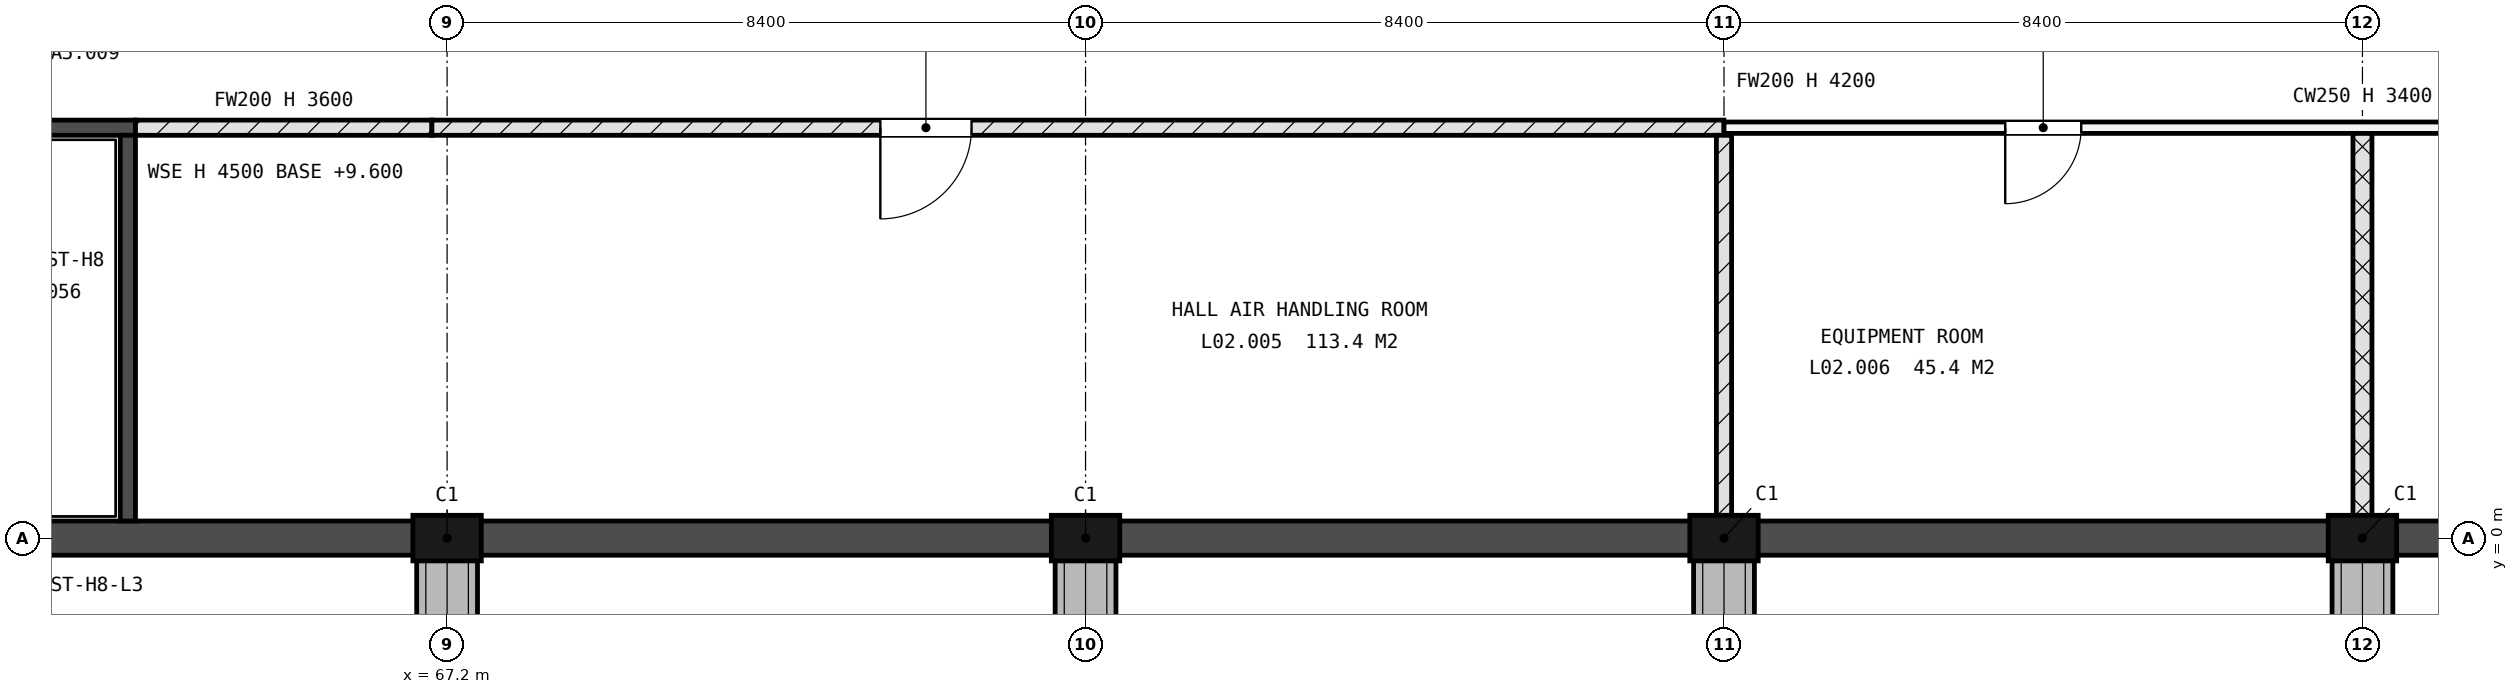
"""IFC4 building model, lengths in metres.
Left out: names, types, materials, properties, quantities, classifications, styles, units other than length and angle.
Written with IfcOpenShell. Run it as: python <this file> out.ifc"""

import sys

from ifc_helpers import new_model, si_unit, direction, frame, frame_2d, origin, origin_2d, place, context, subcontext, project, spatial, rectangle, extrude, element, fill, save


model = new_model("IFC4")
c1 = context("Model", 3, precision=1e-05, world=origin(), true_north=direction((0.0, 1.0)))
c2 = subcontext(c1, "Body", "Model", "MODEL_VIEW")
j1 = project(units=[si_unit("LENGTHUNIT", "METRE"), si_unit("PLANEANGLEUNIT", "RADIAN")], contexts=[c1])
p1 = place(None, origin())
s1 = spatial("IfcSite", under=j1, at=p1, CompositionType="ELEMENT")
p2 = place(p1, origin())
s2 = spatial("IfcBuilding", under=s1, at=p2, CompositionType="ELEMENT")
p3 = place(p2, frame((0.0, 0.0, 9.9)))
s3 = spatial("IfcBuildingStorey", under=s2, at=p3, CompositionType="ELEMENT", Elevation=9.9)
for number, where, z_axis, x_axis in (
    (1, (67.2, 0.0, -0.25), (0.0, 0.0, 1.0), (1.0, 0.0, 0.0)),
    (2, (75.6, 0.0, -0.25), (0.0, 0.0, 1.0), (1.0, 0.0, 0.0)),
    (3, (84.0, 0.0, -0.25), (0.0, 0.0, 1.0), (1.0, 0.0, 0.0)),
    (4, (92.4, 0.0, -0.25), (0.0, 0.0, 1.0), (1.0, 0.0, 0.0)),
):
    element("IfcColumn", number, at=place(p3, frame(where, z_axis=z_axis, x_axis=x_axis)), inside=s3, PredefinedType="PILASTER", context=c2, shape_type="SweptSolid", body=[
        extrude(rectangle(XDim=0.9, YDim=0.6, at=origin_2d()), origin(), (0.0, 0.0, 1.0), 4.45),
    ])
p4 = place(p3, frame((0.0, 0.0, -0.25), z_axis=(0.0, 0.0, 1.0), x_axis=(1.0, 0.0, 0.0)))
e5 = element("IfcWall", 5, at=p4, inside=s3, PredefinedType="SOLIDWALL", context=c2, shape_type="SweptSolid", body=[
    extrude(rectangle(XDim=168.0, YDim=0.45, at=frame_2d((84.0, 0.0))), origin(), (0.0, 0.0, 1.0), 4.45),
])
p5 = place(p4, frame((27.075, 0.0, 1.45)))
e6 = element("IfcOpeningElement", 6, at=p5, cuts=e5, PredefinedType="OPENING", context=c2, shape_type="SweptSolid", body=[
    extrude(rectangle(XDim=0.45, YDim=2.4, at=frame_2d((0.225, 1.2))), frame((0.0, 0.235, 0.0), z_axis=(0.0, -1.0, 0.0), x_axis=(1.0, 0.0, 0.0)), (0.0, 0.0, 1.0), 0.47),
])
p6 = place(p4, frame((31.275, 0.0, 1.45)))
e7 = element("IfcOpeningElement", 7, at=p6, cuts=e5, PredefinedType="OPENING", context=c2, shape_type="SweptSolid", body=[
    extrude(rectangle(XDim=0.45, YDim=2.4, at=frame_2d((0.225, 1.2))), frame((0.0, 0.235, 0.0), z_axis=(0.0, -1.0, 0.0), x_axis=(1.0, 0.0, 0.0)), (0.0, 0.0, 1.0), 0.47),
])
p7 = place(p4, frame((35.475, 0.0, 1.45)))
e8 = element("IfcOpeningElement", 8, at=p7, cuts=e5, PredefinedType="OPENING", context=c2, shape_type="SweptSolid", body=[
    extrude(rectangle(XDim=0.45, YDim=2.4, at=frame_2d((0.225, 1.2))), frame((0.0, 0.235, 0.0), z_axis=(0.0, -1.0, 0.0), x_axis=(1.0, 0.0, 0.0)), (0.0, 0.0, 1.0), 0.47),
])
p8 = place(p4, frame((39.675, 0.0, 1.45)))
e9 = element("IfcOpeningElement", 9, at=p8, cuts=e5, PredefinedType="OPENING", context=c2, shape_type="SweptSolid", body=[
    extrude(rectangle(XDim=0.45, YDim=2.4, at=frame_2d((0.225, 1.2))), frame((0.0, 0.235, 0.0), z_axis=(0.0, -1.0, 0.0), x_axis=(1.0, 0.0, 0.0)), (0.0, 0.0, 1.0), 0.47),
])
p9 = place(p4, frame((94.275, 0.0, 1.45)))
e10 = element("IfcOpeningElement", 10, at=p9, cuts=e5, PredefinedType="OPENING", context=c2, shape_type="SweptSolid", body=[
    extrude(rectangle(XDim=0.45, YDim=2.4, at=frame_2d((0.225, 1.2))), frame((0.0, 0.235, 0.0), z_axis=(0.0, -1.0, 0.0), x_axis=(1.0, 0.0, 0.0)), (0.0, 0.0, 1.0), 0.47),
])
p10 = place(p4, frame((98.475, 0.0, 1.45)))
e11 = element("IfcOpeningElement", 11, at=p10, cuts=e5, PredefinedType="OPENING", context=c2, shape_type="SweptSolid", body=[
    extrude(rectangle(XDim=0.45, YDim=2.4, at=frame_2d((0.225, 1.2))), frame((0.0, 0.235, 0.0), z_axis=(0.0, -1.0, 0.0), x_axis=(1.0, 0.0, 0.0)), (0.0, 0.0, 1.0), 0.47),
])
p11 = place(p4, frame((102.675, 0.0, 1.45)))
e12 = element("IfcOpeningElement", 12, at=p11, cuts=e5, PredefinedType="OPENING", context=c2, shape_type="SweptSolid", body=[
    extrude(rectangle(XDim=0.45, YDim=2.4, at=frame_2d((0.225, 1.2))), frame((0.0, 0.235, 0.0), z_axis=(0.0, -1.0, 0.0), x_axis=(1.0, 0.0, 0.0)), (0.0, 0.0, 1.0), 0.47),
])
p12 = place(p4, frame((106.875, 0.0, 1.45)))
e13 = element("IfcOpeningElement", 13, at=p12, cuts=e5, PredefinedType="OPENING", context=c2, shape_type="SweptSolid", body=[
    extrude(rectangle(XDim=0.45, YDim=2.4, at=frame_2d((0.225, 1.2))), frame((0.0, 0.235, 0.0), z_axis=(0.0, -1.0, 0.0), x_axis=(1.0, 0.0, 0.0)), (0.0, 0.0, 1.0), 0.47),
])
p13 = place(p4, frame((111.075, 0.0, 1.45)))
e14 = element("IfcOpeningElement", 14, at=p13, cuts=e5, PredefinedType="OPENING", context=c2, shape_type="SweptSolid", body=[
    extrude(rectangle(XDim=0.45, YDim=2.4, at=frame_2d((0.225, 1.2))), frame((0.0, 0.235, 0.0), z_axis=(0.0, -1.0, 0.0), x_axis=(1.0, 0.0, 0.0)), (0.0, 0.0, 1.0), 0.47),
])
p14 = place(p4, frame((115.275, 0.0, 1.45)))
e15 = element("IfcOpeningElement", 15, at=p14, cuts=e5, PredefinedType="OPENING", context=c2, shape_type="SweptSolid", body=[
    extrude(rectangle(XDim=0.45, YDim=2.4, at=frame_2d((0.225, 1.2))), frame((0.0, 0.235, 0.0), z_axis=(0.0, -1.0, 0.0), x_axis=(1.0, 0.0, 0.0)), (0.0, 0.0, 1.0), 0.47),
])
p15 = place(p4, frame((127.875, 0.0, 1.45)))
e16 = element("IfcOpeningElement", 16, at=p15, cuts=e5, PredefinedType="OPENING", context=c2, shape_type="SweptSolid", body=[
    extrude(rectangle(XDim=0.45, YDim=2.4, at=frame_2d((0.225, 1.2))), frame((0.0, 0.235, 0.0), z_axis=(0.0, -1.0, 0.0), x_axis=(1.0, 0.0, 0.0)), (0.0, 0.0, 1.0), 0.47),
])
p16 = place(p4, frame((132.075, 0.0, 1.45)))
e17 = element("IfcOpeningElement", 17, at=p16, cuts=e5, PredefinedType="OPENING", context=c2, shape_type="SweptSolid", body=[
    extrude(rectangle(XDim=0.45, YDim=2.4, at=frame_2d((0.225, 1.2))), frame((0.0, 0.235, 0.0), z_axis=(0.0, -1.0, 0.0), x_axis=(1.0, 0.0, 0.0)), (0.0, 0.0, 1.0), 0.47),
])
p17 = place(p4, frame((136.275, 0.0, 1.45)))
e18 = element("IfcOpeningElement", 18, at=p17, cuts=e5, PredefinedType="OPENING", context=c2, shape_type="SweptSolid", body=[
    extrude(rectangle(XDim=0.45, YDim=2.4, at=frame_2d((0.225, 1.2))), frame((0.0, 0.235, 0.0), z_axis=(0.0, -1.0, 0.0), x_axis=(1.0, 0.0, 0.0)), (0.0, 0.0, 1.0), 0.47),
])
p18 = place(p4, frame((140.475, 0.0, 1.45)))
e19 = element("IfcOpeningElement", 19, at=p18, cuts=e5, PredefinedType="OPENING", context=c2, shape_type="SweptSolid", body=[
    extrude(rectangle(XDim=0.45, YDim=2.4, at=frame_2d((0.225, 1.2))), frame((0.0, 0.235, 0.0), z_axis=(0.0, -1.0, 0.0), x_axis=(1.0, 0.0, 0.0)), (0.0, 0.0, 1.0), 0.47),
])
p19 = place(p4, frame((144.675, 0.0, 1.45)))
e20 = element("IfcOpeningElement", 20, at=p19, cuts=e5, PredefinedType="OPENING", context=c2, shape_type="SweptSolid", body=[
    extrude(rectangle(XDim=0.45, YDim=2.4, at=frame_2d((0.225, 1.2))), frame((0.0, 0.235, 0.0), z_axis=(0.0, -1.0, 0.0), x_axis=(1.0, 0.0, 0.0)), (0.0, 0.0, 1.0), 0.47),
])
p20 = place(p4, frame((148.875, 0.0, 1.45)))
e21 = element("IfcOpeningElement", 21, at=p20, cuts=e5, PredefinedType="OPENING", context=c2, shape_type="SweptSolid", body=[
    extrude(rectangle(XDim=0.45, YDim=2.4, at=frame_2d((0.225, 1.2))), frame((0.0, 0.235, 0.0), z_axis=(0.0, -1.0, 0.0), x_axis=(1.0, 0.0, 0.0)), (0.0, 0.0, 1.0), 0.47),
])
p21 = place(p4, frame((153.075, 0.0, 1.45)))
e22 = element("IfcOpeningElement", 22, at=p21, cuts=e5, PredefinedType="OPENING", context=c2, shape_type="SweptSolid", body=[
    extrude(rectangle(XDim=0.45, YDim=2.4, at=frame_2d((0.225, 1.2))), frame((0.0, 0.235, 0.0), z_axis=(0.0, -1.0, 0.0), x_axis=(1.0, 0.0, 0.0)), (0.0, 0.0, 1.0), 0.47),
])
p22 = place(p4, frame((157.275, 0.0, 1.45)))
e23 = element("IfcOpeningElement", 23, at=p22, cuts=e5, PredefinedType="OPENING", context=c2, shape_type="SweptSolid", body=[
    extrude(rectangle(XDim=0.45, YDim=2.4, at=frame_2d((0.225, 1.2))), frame((0.0, 0.235, 0.0), z_axis=(0.0, -1.0, 0.0), x_axis=(1.0, 0.0, 0.0)), (0.0, 0.0, 1.0), 0.47),
])
for number, where, z_axis, x_axis in (
    (24, (67.2, -0.225, -0.25), (0.0, 0.0, 1.0), (0.0, -1.0, 0.0)),
    (25, (75.6, -0.225, -0.25), (0.0, 0.0, 1.0), (0.0, -1.0, 0.0)),
    (26, (84.0, -0.225, -0.25), (0.0, 0.0, 1.0), (0.0, -1.0, 0.0)),
    (27, (92.4, -0.225, -0.25), (0.0, 0.0, 1.0), (0.0, -1.0, 0.0)),
):
    element("IfcWall", number, at=place(p3, frame(where, z_axis=z_axis, x_axis=x_axis)), inside=s3, PredefinedType="SOLIDWALL", context=c2, shape_type="SweptSolid", body=[
        extrude(rectangle(XDim=0.9, YDim=0.8, at=frame_2d((0.45, 0.0))), origin(), (0.0, 0.0, 1.0), 4.45),
    ])
p23 = place(p3, frame((54.5, 5.4, -0.3), z_axis=(0.0, 0.0, 1.0), x_axis=(1.0, 0.0, 0.0)))
e28 = element("IfcWall", 28, at=p23, inside=s3, PredefinedType="SHEAR", context=c2, shape_type="SweptSolid", body=[
    extrude(rectangle(XDim=8.6, YDim=0.2, at=frame_2d((4.3, 0.0))), origin(), (0.0, 0.0, 1.0), 4.5),
])
p24 = place(p23, frame((0.35, 0.0, 0.3)))
e29 = element("IfcOpeningElement", 29, at=p24, cuts=e28, PredefinedType="OPENING", context=c2, shape_type="SweptSolid", body=[
    extrude(rectangle(XDim=1.0, YDim=2.1, at=frame_2d((0.5, 1.05))), frame((0.0, 0.11, 0.0), z_axis=(0.0, -1.0, 0.0), x_axis=(1.0, 0.0, 0.0)), (0.0, 0.0, 1.0), 0.22),
])
p25 = place(p3, frame((63.0, 0.225, -0.3), z_axis=(0.0, 0.0, 1.0), x_axis=(0.0, 1.0, 0.0)))
e30 = element("IfcWall", 30, at=p25, inside=s3, PredefinedType="SHEAR", context=c2, shape_type="SweptSolid", body=[
    extrude(rectangle(XDim=5.075, YDim=0.2, at=frame_2d((2.538, 0.0))), origin(), (0.0, 0.0, 1.0), 4.5),
])
p26 = place(p3, frame((63.1, 5.4, 0.0), z_axis=(0.0, 0.0, 1.0), x_axis=(1.0, 0.0, 0.0)))
e31 = element("IfcWall", 31, at=p26, inside=s3, PredefinedType="SOLIDWALL", context=c2, shape_type="SweptSolid", body=[
    extrude(rectangle(XDim=3.9, YDim=0.2, at=frame_2d((1.95, 0.0))), origin(), (0.0, 0.0, 1.0), 3.6),
])
p27 = place(p3, frame((67.0, 5.4, 0.0), z_axis=(0.0, 0.0, 1.0), x_axis=(1.0, 0.0, 0.0)))
e32 = element("IfcWall", 32, at=p27, inside=s3, PredefinedType="SOLIDWALL", context=c2, shape_type="SweptSolid", body=[
    extrude(rectangle(XDim=17.0, YDim=0.2, at=frame_2d((8.5, 0.0))), origin(), (0.0, 0.0, 1.0), 4.2),
])
p28 = place(p27, frame((5.9, 0.0, 0.0)))
e33 = element("IfcOpeningElement", 33, at=p28, cuts=e32, PredefinedType="OPENING", context=c2, shape_type="SweptSolid", body=[
    extrude(rectangle(XDim=1.2, YDim=2.4, at=frame_2d((0.6, 1.2))), frame((0.0, 0.11, 0.0), z_axis=(0.0, -1.0, 0.0), x_axis=(1.0, 0.0, 0.0)), (0.0, 0.0, 1.0), 0.22),
])
p29 = place(p3, frame((84.0, 5.4, 0.0), z_axis=(0.0, 0.0, 1.0), x_axis=(1.0, 0.0, 0.0)))
e34 = element("IfcWall", 34, at=p29, inside=s3, PredefinedType="PARTITIONING", context=c2, shape_type="SweptSolid", body=[
    extrude(rectangle(XDim=33.5, YDim=0.15, at=frame_2d((16.75, 0.0))), origin(), (0.0, 0.0, 1.0), 4.2),
])
p30 = place(p29, frame((3.7, 0.0, 0.0)))
e35 = element("IfcOpeningElement", 35, at=p30, cuts=e34, PredefinedType="OPENING", context=c2, shape_type="SweptSolid", body=[
    extrude(rectangle(XDim=1.0, YDim=2.1, at=frame_2d((0.5, 1.05))), frame((0.0, 0.085, 0.0), z_axis=(0.0, -1.0, 0.0), x_axis=(1.0, 0.0, 0.0)), (0.0, 0.0, 1.0), 0.17),
])
p31 = place(p29, frame((20.4, 0.0, 0.0)))
e36 = element("IfcOpeningElement", 36, at=p31, cuts=e34, PredefinedType="OPENING", context=c2, shape_type="SweptSolid", body=[
    extrude(rectangle(XDim=1.2, YDim=2.1, at=frame_2d((0.6, 1.05))), frame((0.0, 0.085, 0.0), z_axis=(0.0, -1.0, 0.0), x_axis=(1.0, 0.0, 0.0)), (0.0, 0.0, 1.0), 0.17),
])
p32 = place(p3, frame((84.0, 0.225, 0.0), z_axis=(0.0, 0.0, 1.0), x_axis=(0.0, 1.0, 0.0)))
e37 = element("IfcWall", 37, at=p32, inside=s3, PredefinedType="SOLIDWALL", context=c2, shape_type="SweptSolid", body=[
    extrude(rectangle(XDim=5.075, YDim=0.2, at=frame_2d((2.538, 0.0))), origin(), (0.0, 0.0, 1.0), 4.2),
])
p33 = place(p3, frame((92.4, 0.225, 0.0), z_axis=(0.0, 0.0, 1.0), x_axis=(0.0, 1.0, 0.0)))
e38 = element("IfcWall", 38, at=p33, inside=s3, PredefinedType="SOLIDWALL", context=c2, shape_type="SweptSolid", body=[
    extrude(rectangle(XDim=5.1, YDim=0.25, at=frame_2d((2.55, 0.0))), origin(), (0.0, 0.0, 1.0), 3.4),
])
p34 = place(p28, origin())
e39 = element("IfcDoor", 39, at=p34, inside=s3, OperationType="SINGLE_SWING_LEFT", PredefinedType="DOOR", context=c2, shape_type="SweptSolid", body=[
    extrude(rectangle(XDim=1.2, YDim=2.4, at=frame_2d((0.6, 1.2))), frame((0.0, 0.025, 0.0), z_axis=(0.0, -1.0, 0.0), x_axis=(1.0, 0.0, 0.0)), (0.0, 0.0, 1.0), 0.05),
])
fill(e33, e39)
p35 = place(p30, origin())
e40 = element("IfcDoor", 40, at=p35, inside=s3, OperationType="SINGLE_SWING_LEFT", PredefinedType="DOOR", context=c2, shape_type="SweptSolid", body=[
    extrude(rectangle(XDim=1.0, YDim=2.1, at=frame_2d((0.5, 1.05))), frame((0.0, 0.025, 0.0), z_axis=(0.0, -1.0, 0.0), x_axis=(1.0, 0.0, 0.0)), (0.0, 0.0, 1.0), 0.05),
])
fill(e35, e40)
save(model, sys.argv[1])
